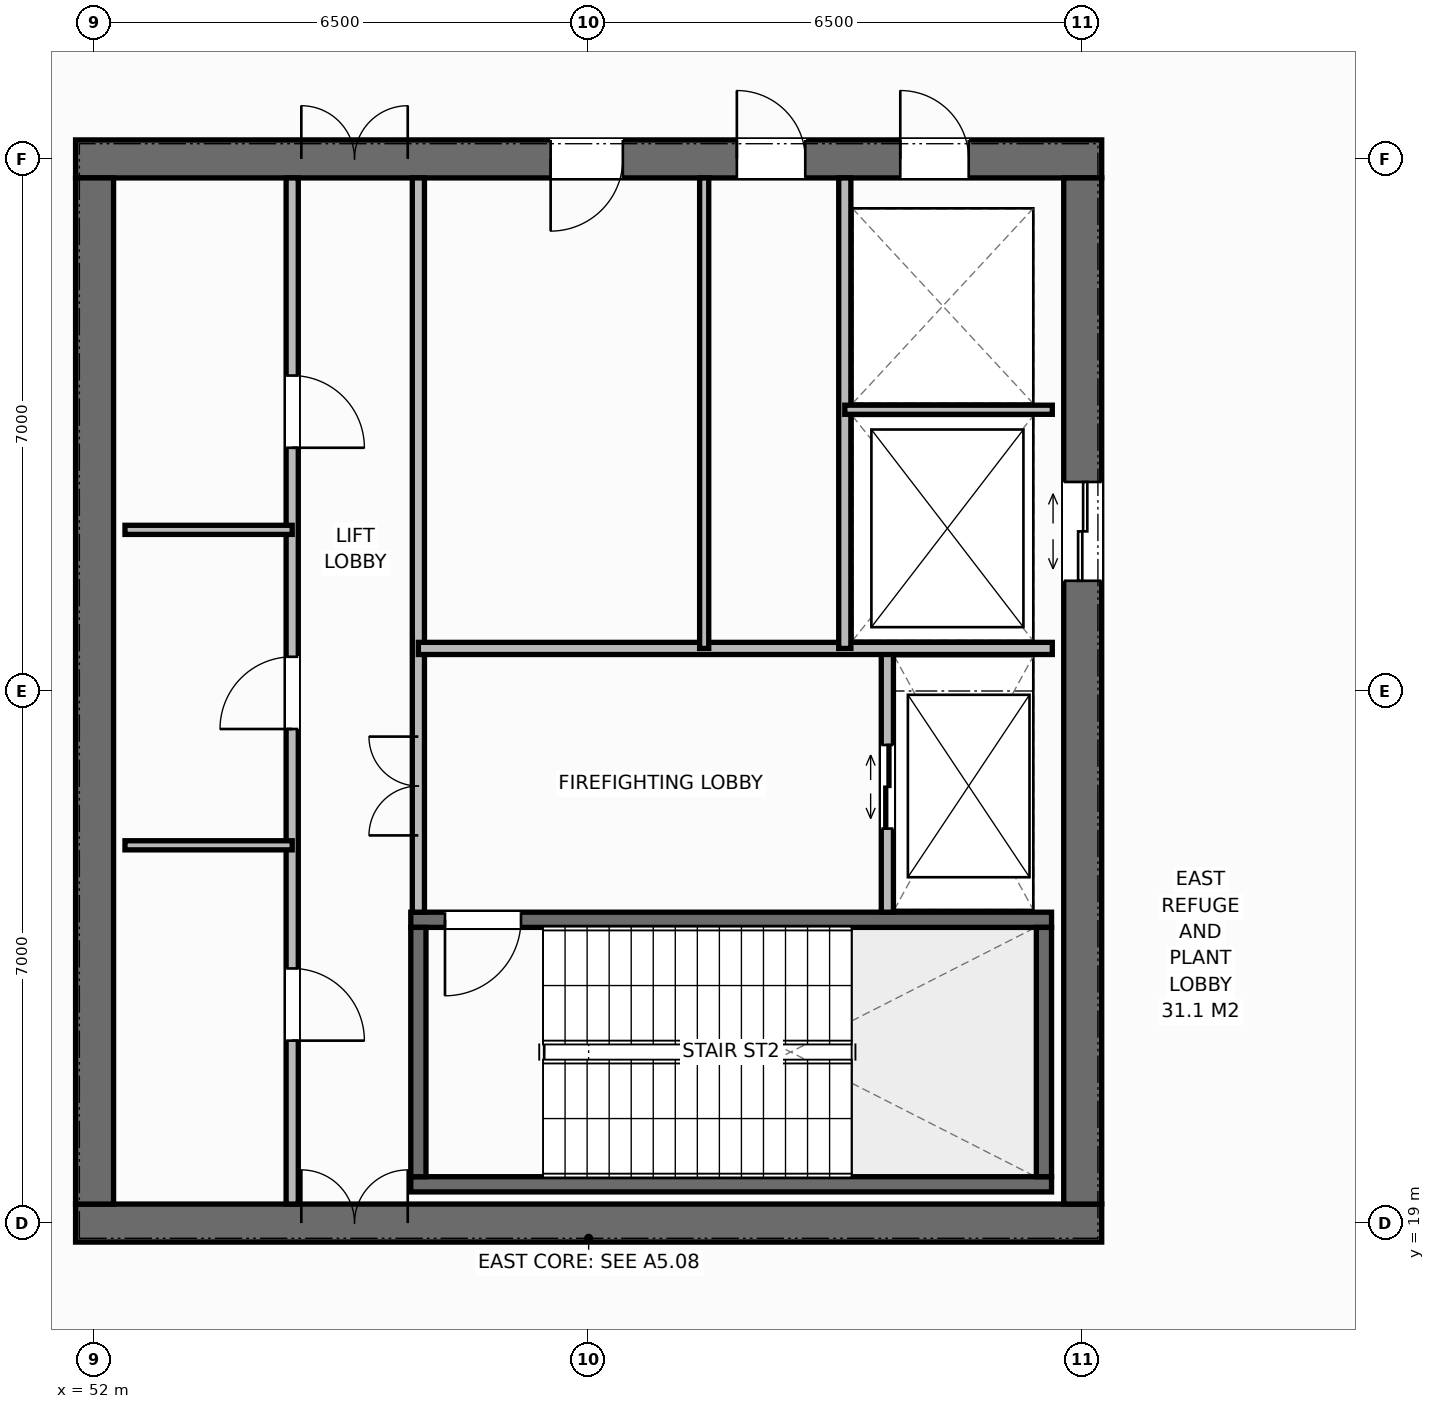
"""IFC4 building model, lengths in metres.
Left out: names, types, materials, properties, quantities, classifications, styles, units other than length and angle.
Written with IfcOpenShell. Run it as: python <this file> out.ifc"""

import sys

from ifc_helpers import new_model, si_unit, direction, frame, frame_2d, origin, place, context, subcontext, project, spatial, rectangle, extrude, element, fill, save


model = new_model("IFC4")
c1 = context("Model", 3, precision=1e-05, world=origin(), true_north=direction((0.0, 1.0)))
c2 = subcontext(c1, "Body", "Model", "MODEL_VIEW")
j1 = project(units=[si_unit("LENGTHUNIT", "METRE"), si_unit("PLANEANGLEUNIT", "RADIAN")], contexts=[c1])
p1 = place(None, origin())
s1 = spatial("IfcSite", under=j1, at=p1, CompositionType="ELEMENT")
p2 = place(p1, origin())
s2 = spatial("IfcBuilding", under=s1, at=p2, CompositionType="ELEMENT")
p3 = place(p2, frame((0.0, 0.0, 310.4)))
s3 = spatial("IfcBuildingStorey", under=s2, at=p3, CompositionType="ELEMENT", Elevation=310.4)
p4 = place(p3, frame((51.75, 19.0, 0.0), z_axis=(0.0, 0.0, 1.0), x_axis=(1.0, 0.0, 0.0)))
e1 = element("IfcWall", 1, at=p4, inside=s3, PredefinedType="SHEAR", context=c2, shape_type="SweptSolid", body=[
    extrude(rectangle(XDim=13.5, YDim=0.5, at=frame_2d((6.75, 0.0))), origin(), (0.0, 0.0, 1.0), 5.0),
])
p5 = place(p4, frame((2.97, 0.0, 0.0)))
e2 = element("IfcOpeningElement", 2, at=p5, cuts=e1, PredefinedType="OPENING", context=c2, shape_type="SweptSolid", body=[
    extrude(rectangle(XDim=1.4, YDim=2.2, at=frame_2d((0.7, 1.1))), frame((0.0, 0.26, 0.0), z_axis=(0.0, -1.0, 0.0), x_axis=(1.0, 0.0, 0.0)), (0.0, 0.0, 1.0), 0.52),
])
p6 = place(p3, frame((51.75, 33.0, 0.0), z_axis=(0.0, 0.0, 1.0), x_axis=(1.0, 0.0, 0.0)))
e3 = element("IfcWall", 3, at=p6, inside=s3, PredefinedType="SHEAR", context=c2, shape_type="SweptSolid", body=[
    extrude(rectangle(XDim=13.5, YDim=0.5, at=frame_2d((6.75, 0.0))), origin(), (0.0, 0.0, 1.0), 5.0),
])
p7 = place(p6, frame((2.97, 0.0, 0.0)))
e4 = element("IfcOpeningElement", 4, at=p7, cuts=e3, PredefinedType="OPENING", context=c2, shape_type="SweptSolid", body=[
    extrude(rectangle(XDim=1.4, YDim=2.2, at=frame_2d((0.7, 1.1))), frame((0.0, 0.26, 0.0), z_axis=(0.0, -1.0, 0.0), x_axis=(1.0, 0.0, 0.0)), (0.0, 0.0, 1.0), 0.52),
])
p8 = place(p6, frame((10.85, 0.0, 0.0)))
e5 = element("IfcOpeningElement", 5, at=p8, cuts=e3, PredefinedType="OPENING", context=c2, shape_type="SweptSolid", body=[
    extrude(rectangle(XDim=0.9, YDim=2.15, at=frame_2d((0.45, 1.075))), frame((0.0, 0.26, 0.0), z_axis=(0.0, -1.0, 0.0), x_axis=(1.0, 0.0, 0.0)), (0.0, 0.0, 1.0), 0.52),
])
p9 = place(p6, frame((6.25, 0.0, 0.0)))
e6 = element("IfcOpeningElement", 6, at=p9, cuts=e3, PredefinedType="OPENING", context=c2, shape_type="SweptSolid", body=[
    extrude(rectangle(XDim=0.95, YDim=2.15, at=frame_2d((0.475, 1.075))), frame((0.0, 0.26, 0.0), z_axis=(0.0, -1.0, 0.0), x_axis=(1.0, 0.0, 0.0)), (0.0, 0.0, 1.0), 0.52),
])
p10 = place(p6, frame((8.7, 0.0, 0.0)))
e7 = element("IfcOpeningElement", 7, at=p10, cuts=e3, PredefinedType="OPENING", context=c2, shape_type="SweptSolid", body=[
    extrude(rectangle(XDim=0.9, YDim=2.15, at=frame_2d((0.45, 1.075))), frame((0.0, 0.26, 0.0), z_axis=(0.0, -1.0, 0.0), x_axis=(1.0, 0.0, 0.0)), (0.0, 0.0, 1.0), 0.52),
])
p11 = place(p3, frame((52.0, 19.25, 0.0), z_axis=(0.0, 0.0, 1.0), x_axis=(0.0, 1.0, 0.0)))
e8 = element("IfcWall", 8, at=p11, inside=s3, PredefinedType="SHEAR", context=c2, shape_type="SweptSolid", body=[
    extrude(rectangle(XDim=13.5, YDim=0.5, at=frame_2d((6.75, 0.0))), origin(), (0.0, 0.0, 1.0), 5.0),
])
p12 = place(p3, frame((65.0, 19.25, 0.0), z_axis=(0.0, 0.0, 1.0), x_axis=(0.0, 1.0, 0.0)))
e9 = element("IfcWall", 9, at=p12, inside=s3, PredefinedType="SHEAR", context=c2, shape_type="SweptSolid", body=[
    extrude(rectangle(XDim=13.5, YDim=0.5, at=frame_2d((6.75, 0.0))), origin(), (0.0, 0.0, 1.0), 5.0),
])
p13 = place(p12, frame((8.2, 0.0, 0.0)))
e10 = element("IfcOpeningElement", 10, at=p13, cuts=e9, PredefinedType="OPENING", context=c2, shape_type="SweptSolid", body=[
    extrude(rectangle(XDim=1.3, YDim=2.2, at=frame_2d((0.65, 1.1))), frame((0.0, 0.26, 0.0), z_axis=(0.0, -1.0, 0.0), x_axis=(1.0, 0.0, 0.0)), (0.0, 0.0, 1.0), 0.52),
])
p14 = place(p3, frame((56.16, 19.51, 0.0), z_axis=(0.0, 0.0, 1.0), x_axis=(1.0, 0.0, 0.0)))
e11 = element("IfcWall", 11, at=p14, inside=s3, PredefinedType="SHEAR", context=c2, shape_type="SweptSolid", body=[
    extrude(rectangle(XDim=8.43, YDim=0.2, at=frame_2d((4.215, 0.0))), origin(), (0.0, 0.0, 1.0), 5.0),
])
p15 = place(p3, frame((56.16, 22.99, 0.0), z_axis=(0.0, 0.0, 1.0), x_axis=(1.0, 0.0, 0.0)))
e12 = element("IfcWall", 12, at=p15, inside=s3, PredefinedType="SHEAR", context=c2, shape_type="SweptSolid", body=[
    extrude(rectangle(XDim=8.43, YDim=0.2, at=frame_2d((4.215, 0.0))), origin(), (0.0, 0.0, 1.0), 5.0),
])
p16 = place(p15, frame((0.45, 0.0, 0.0)))
e13 = element("IfcOpeningElement", 13, at=p16, cuts=e12, PredefinedType="OPENING", context=c2, shape_type="SweptSolid", body=[
    extrude(rectangle(XDim=1.0, YDim=2.15, at=frame_2d((0.5, 1.075))), frame((0.0, 0.11, 0.0), z_axis=(0.0, -1.0, 0.0), x_axis=(1.0, 0.0, 0.0)), (0.0, 0.0, 1.0), 0.22),
])
for number, where, z_axis, x_axis in (
    (14, (56.26, 19.61, 0.0), (0.0, 0.0, 1.0), (0.0, 1.0, 0.0)),
    (15, (64.49, 19.61, 0.0), (0.0, 0.0, 1.0), (0.0, 1.0, 0.0)),
):
    element("IfcWall", number, at=place(p3, frame(where, z_axis=z_axis, x_axis=x_axis)), inside=s3, PredefinedType="SHEAR", context=c2, shape_type="SweptSolid", body=[
        extrude(rectangle(XDim=3.28, YDim=0.2, at=frame_2d((1.64, 0.0))), origin(), (0.0, 0.0, 1.0), 5.0),
    ])
p17 = place(p3, frame((54.6, 19.25, 0.0), z_axis=(0.0, 0.0, 1.0), x_axis=(0.0, 1.0, 0.0)))
e16 = element("IfcWall", 16, at=p17, inside=s3, PredefinedType="STANDARD", context=c2, shape_type="SweptSolid", body=[
    extrude(rectangle(XDim=13.5, YDim=0.16, at=frame_2d((6.75, 0.0))), origin(), (0.0, 0.0, 1.0), 4.72),
])
p18 = place(p17, frame((2.15, 0.0, 0.0)))
e17 = element("IfcOpeningElement", 17, at=p18, cuts=e16, PredefinedType="OPENING", context=c2, shape_type="SweptSolid", body=[
    extrude(rectangle(XDim=0.95, YDim=2.15, at=frame_2d((0.475, 1.075))), frame((0.0, 0.09, 0.0), z_axis=(0.0, -1.0, 0.0), x_axis=(1.0, 0.0, 0.0)), (0.0, 0.0, 1.0), 0.18),
])
p19 = place(p17, frame((6.25, 0.0, 0.0)))
e18 = element("IfcOpeningElement", 18, at=p19, cuts=e16, PredefinedType="OPENING", context=c2, shape_type="SweptSolid", body=[
    extrude(rectangle(XDim=0.95, YDim=2.15, at=frame_2d((0.475, 1.075))), frame((0.0, 0.09, 0.0), z_axis=(0.0, -1.0, 0.0), x_axis=(1.0, 0.0, 0.0)), (0.0, 0.0, 1.0), 0.18),
])
p20 = place(p17, frame((9.95, 0.0, 0.0)))
e19 = element("IfcOpeningElement", 19, at=p20, cuts=e16, PredefinedType="OPENING", context=c2, shape_type="SweptSolid", body=[
    extrude(rectangle(XDim=0.95, YDim=2.15, at=frame_2d((0.475, 1.075))), frame((0.0, 0.09, 0.0), z_axis=(0.0, -1.0, 0.0), x_axis=(1.0, 0.0, 0.0)), (0.0, 0.0, 1.0), 0.18),
])
p21 = place(p3, frame((56.26, 23.09, 0.0), z_axis=(0.0, 0.0, 1.0), x_axis=(0.0, 1.0, 0.0)))
e20 = element("IfcWall", 20, at=p21, inside=s3, PredefinedType="STANDARD", context=c2, shape_type="SweptSolid", body=[
    extrude(rectangle(XDim=9.66, YDim=0.16, at=frame_2d((4.83, 0.0))), origin(), (0.0, 0.0, 1.0), 4.72),
])
p22 = place(p21, frame((1.01, 0.0, 0.0)))
e21 = element("IfcOpeningElement", 21, at=p22, cuts=e20, PredefinedType="OPENING", context=c2, shape_type="SweptSolid", body=[
    extrude(rectangle(XDim=1.3, YDim=2.2, at=frame_2d((0.65, 1.1))), frame((0.0, 0.09, 0.0), z_axis=(0.0, -1.0, 0.0), x_axis=(1.0, 0.0, 0.0)), (0.0, 0.0, 1.0), 0.18),
])
for number, where, z_axis, x_axis in (
    (22, (52.4, 23.97, 0.0), (0.0, 0.0, 1.0), (1.0, 0.0, 0.0)),
    (23, (52.4, 28.12, 0.0), (0.0, 0.0, 1.0), (1.0, 0.0, 0.0)),
):
    element("IfcWall", number, at=place(p3, frame(where, z_axis=z_axis, x_axis=x_axis)), inside=s3, PredefinedType="PARTITIONING", context=c2, shape_type="SweptSolid", body=[
        extrude(rectangle(XDim=2.2, YDim=0.12, at=frame_2d((1.1, 0.0))), origin(), (0.0, 0.0, 1.0), 4.72),
    ])
p23 = place(p3, frame((62.43, 23.09, 0.0), z_axis=(0.0, 0.0, 1.0), x_axis=(0.0, 1.0, 0.0)))
e24 = element("IfcWall", 24, at=p23, inside=s3, PredefinedType="STANDARD", context=c2, shape_type="SweptSolid", body=[
    extrude(rectangle(XDim=3.47, YDim=0.16, at=frame_2d((1.735, 0.0))), origin(), (0.0, 0.0, 1.0), 4.72),
])
p24 = place(p23, frame((1.1, 0.0, 0.0)))
e25 = element("IfcOpeningElement", 25, at=p24, cuts=e24, PredefinedType="OPENING", context=c2, shape_type="SweptSolid", body=[
    extrude(rectangle(XDim=1.1, YDim=2.2, at=frame_2d((0.55, 1.1))), frame((0.0, 0.09, 0.0), z_axis=(0.0, -1.0, 0.0), x_axis=(1.0, 0.0, 0.0)), (0.0, 0.0, 1.0), 0.18),
])
p25 = place(p3, frame((56.26, 26.56, 0.0), z_axis=(0.0, 0.0, 1.0), x_axis=(1.0, 0.0, 0.0)))
e26 = element("IfcWall", 26, at=p25, inside=s3, PredefinedType="STANDARD", context=c2, shape_type="SweptSolid", body=[
    extrude(rectangle(XDim=8.34, YDim=0.16, at=frame_2d((4.17, 0.0))), origin(), (0.0, 0.0, 1.0), 4.72),
])
p26 = place(p3, frame((61.87, 26.56, 0.0), z_axis=(0.0, 0.0, 1.0), x_axis=(0.0, 1.0, 0.0)))
e27 = element("IfcWall", 27, at=p26, inside=s3, PredefinedType="STANDARD", context=c2, shape_type="SweptSolid", body=[
    extrude(rectangle(XDim=6.19, YDim=0.16, at=frame_2d((3.095, 0.0))), origin(), (0.0, 0.0, 1.0), 4.72),
])
p27 = place(p3, frame((61.87, 29.7, 0.0), z_axis=(0.0, 0.0, 1.0), x_axis=(1.0, 0.0, 0.0)))
e28 = element("IfcWall", 28, at=p27, inside=s3, PredefinedType="PARTITIONING", context=c2, shape_type="SweptSolid", body=[
    extrude(rectangle(XDim=2.73, YDim=0.12, at=frame_2d((1.365, 0.0))), origin(), (0.0, 0.0, 1.0), 4.72),
])
p28 = place(p3, frame((60.02, 26.56, 0.0), z_axis=(0.0, 0.0, 1.0), x_axis=(0.0, 1.0, 0.0)))
e29 = element("IfcWall", 29, at=p28, inside=s3, PredefinedType="PARTITIONING", context=c2, shape_type="SweptSolid", body=[
    extrude(rectangle(XDim=6.19, YDim=0.12, at=frame_2d((3.095, 0.0))), origin(), (0.0, 0.0, 1.0), 4.72),
])
p29 = place(p5, origin())
e30 = element("IfcDoor", 30, at=p29, inside=s3, OperationType="DOUBLE_DOOR_SINGLE_SWING", PredefinedType="DOOR", context=c2, shape_type="SweptSolid", body=[
    extrude(rectangle(XDim=1.4, YDim=2.2, at=frame_2d((0.7, 1.1))), frame((0.0, 0.075, 0.0), z_axis=(0.0, -1.0, 0.0), x_axis=(1.0, 0.0, 0.0)), (0.0, 0.0, 1.0), 0.05),
])
fill(e2, e30)
p30 = place(p7, origin())
e31 = element("IfcDoor", 31, at=p30, inside=s3, OperationType="DOUBLE_DOOR_SINGLE_SWING", PredefinedType="DOOR", context=c2, shape_type="SweptSolid", body=[
    extrude(rectangle(XDim=1.4, YDim=2.2, at=frame_2d((0.7, 1.1))), frame((0.0, -0.025, 0.0), z_axis=(0.0, -1.0, 0.0), x_axis=(1.0, 0.0, 0.0)), (0.0, 0.0, 1.0), 0.05),
])
fill(e4, e31)
p31 = place(p18, origin())
e32 = element("IfcDoor", 32, at=p31, inside=s3, OperationType="SINGLE_SWING_RIGHT", PredefinedType="DOOR", context=c2, shape_type="SweptSolid", body=[
    extrude(rectangle(XDim=0.95, YDim=2.15, at=frame_2d((0.475, 1.075))), frame((0.0, 0.025, 0.0), z_axis=(0.0, -1.0, 0.0), x_axis=(1.0, 0.0, 0.0)), (0.0, 0.0, 1.0), 0.05),
])
fill(e17, e32)
p32 = place(p19, origin())
e33 = element("IfcDoor", 33, at=p32, inside=s3, OperationType="SINGLE_SWING_LEFT", PredefinedType="DOOR", context=c2, shape_type="SweptSolid", body=[
    extrude(rectangle(XDim=0.95, YDim=2.15, at=frame_2d((0.475, 1.075))), frame((0.0, 0.025, 0.0), z_axis=(0.0, -1.0, 0.0), x_axis=(1.0, 0.0, 0.0)), (0.0, 0.0, 1.0), 0.05),
])
fill(e18, e33)
p33 = place(p20, origin())
e34 = element("IfcDoor", 34, at=p33, inside=s3, OperationType="SINGLE_SWING_RIGHT", PredefinedType="DOOR", context=c2, shape_type="SweptSolid", body=[
    extrude(rectangle(XDim=0.95, YDim=2.15, at=frame_2d((0.475, 1.075))), frame((0.0, 0.025, 0.0), z_axis=(0.0, -1.0, 0.0), x_axis=(1.0, 0.0, 0.0)), (0.0, 0.0, 1.0), 0.05),
])
fill(e19, e34)
p34 = place(p16, origin())
e35 = element("IfcDoor", 35, at=p34, inside=s3, OperationType="SINGLE_SWING_RIGHT", PredefinedType="DOOR", context=c2, shape_type="SweptSolid", body=[
    extrude(rectangle(XDim=1.0, YDim=2.15, at=frame_2d((0.5, 1.075))), frame((0.0, 0.025, 0.0), z_axis=(0.0, -1.0, 0.0), x_axis=(1.0, 0.0, 0.0)), (0.0, 0.0, 1.0), 0.05),
])
fill(e13, e35)
p35 = place(p24, origin())
e36 = element("IfcDoor", 36, at=p35, inside=s3, OperationType="DOUBLE_DOOR_SLIDING", PredefinedType="DOOR", context=c2, shape_type="SweptSolid", body=[
    extrude(rectangle(XDim=1.1, YDim=2.2, at=frame_2d((0.55, 1.1))), frame((0.0, 0.025, 0.0), z_axis=(0.0, -1.0, 0.0), x_axis=(1.0, 0.0, 0.0)), (0.0, 0.0, 1.0), 0.05),
])
fill(e25, e36)
p36 = place(p22, origin())
e37 = element("IfcDoor", 37, at=p36, inside=s3, OperationType="DOUBLE_DOOR_SINGLE_SWING", PredefinedType="DOOR", context=c2, shape_type="SweptSolid", body=[
    extrude(rectangle(XDim=1.3, YDim=2.2, at=frame_2d((0.65, 1.1))), frame((0.0, 0.025, 0.0), z_axis=(0.0, -1.0, 0.0), x_axis=(1.0, 0.0, 0.0)), (0.0, 0.0, 1.0), 0.05),
])
fill(e21, e37)
p37 = place(p13, origin())
e38 = element("IfcDoor", 38, at=p37, inside=s3, OperationType="DOUBLE_DOOR_SLIDING", PredefinedType="DOOR", context=c2, shape_type="SweptSolid", body=[
    extrude(rectangle(XDim=1.3, YDim=2.2, at=frame_2d((0.65, 1.1))), frame((0.0, 0.025, 0.0), z_axis=(0.0, -1.0, 0.0), x_axis=(1.0, 0.0, 0.0)), (0.0, 0.0, 1.0), 0.05),
])
fill(e10, e38)
p38 = place(p8, origin())
e39 = element("IfcDoor", 39, at=p38, inside=s3, OperationType="SINGLE_SWING_LEFT", PredefinedType="DOOR", context=c2, shape_type="SweptSolid", body=[
    extrude(rectangle(XDim=0.9, YDim=2.15, at=frame_2d((0.45, 1.075))), frame((0.0, -0.025, 0.0), z_axis=(0.0, -1.0, 0.0), x_axis=(1.0, 0.0, 0.0)), (0.0, 0.0, 1.0), 0.05),
])
fill(e5, e39)
p39 = place(p9, origin())
e40 = element("IfcDoor", 40, at=p39, inside=s3, OperationType="SINGLE_SWING_RIGHT", PredefinedType="DOOR", context=c2, shape_type="SweptSolid", body=[
    extrude(rectangle(XDim=0.95, YDim=2.15, at=frame_2d((0.475, 1.075))), frame((0.0, -0.025, 0.0), z_axis=(0.0, -1.0, 0.0), x_axis=(1.0, 0.0, 0.0)), (0.0, 0.0, 1.0), 0.05),
])
fill(e6, e40)
p40 = place(p10, origin())
e41 = element("IfcDoor", 41, at=p40, inside=s3, OperationType="SINGLE_SWING_LEFT", PredefinedType="DOOR", context=c2, shape_type="SweptSolid", body=[
    extrude(rectangle(XDim=0.9, YDim=2.15, at=frame_2d((0.45, 1.075))), frame((0.0, -0.025, 0.0), z_axis=(0.0, -1.0, 0.0), x_axis=(1.0, 0.0, 0.0)), (0.0, 0.0, 1.0), 0.05),
])
fill(e7, e41)
save(model, sys.argv[1])
